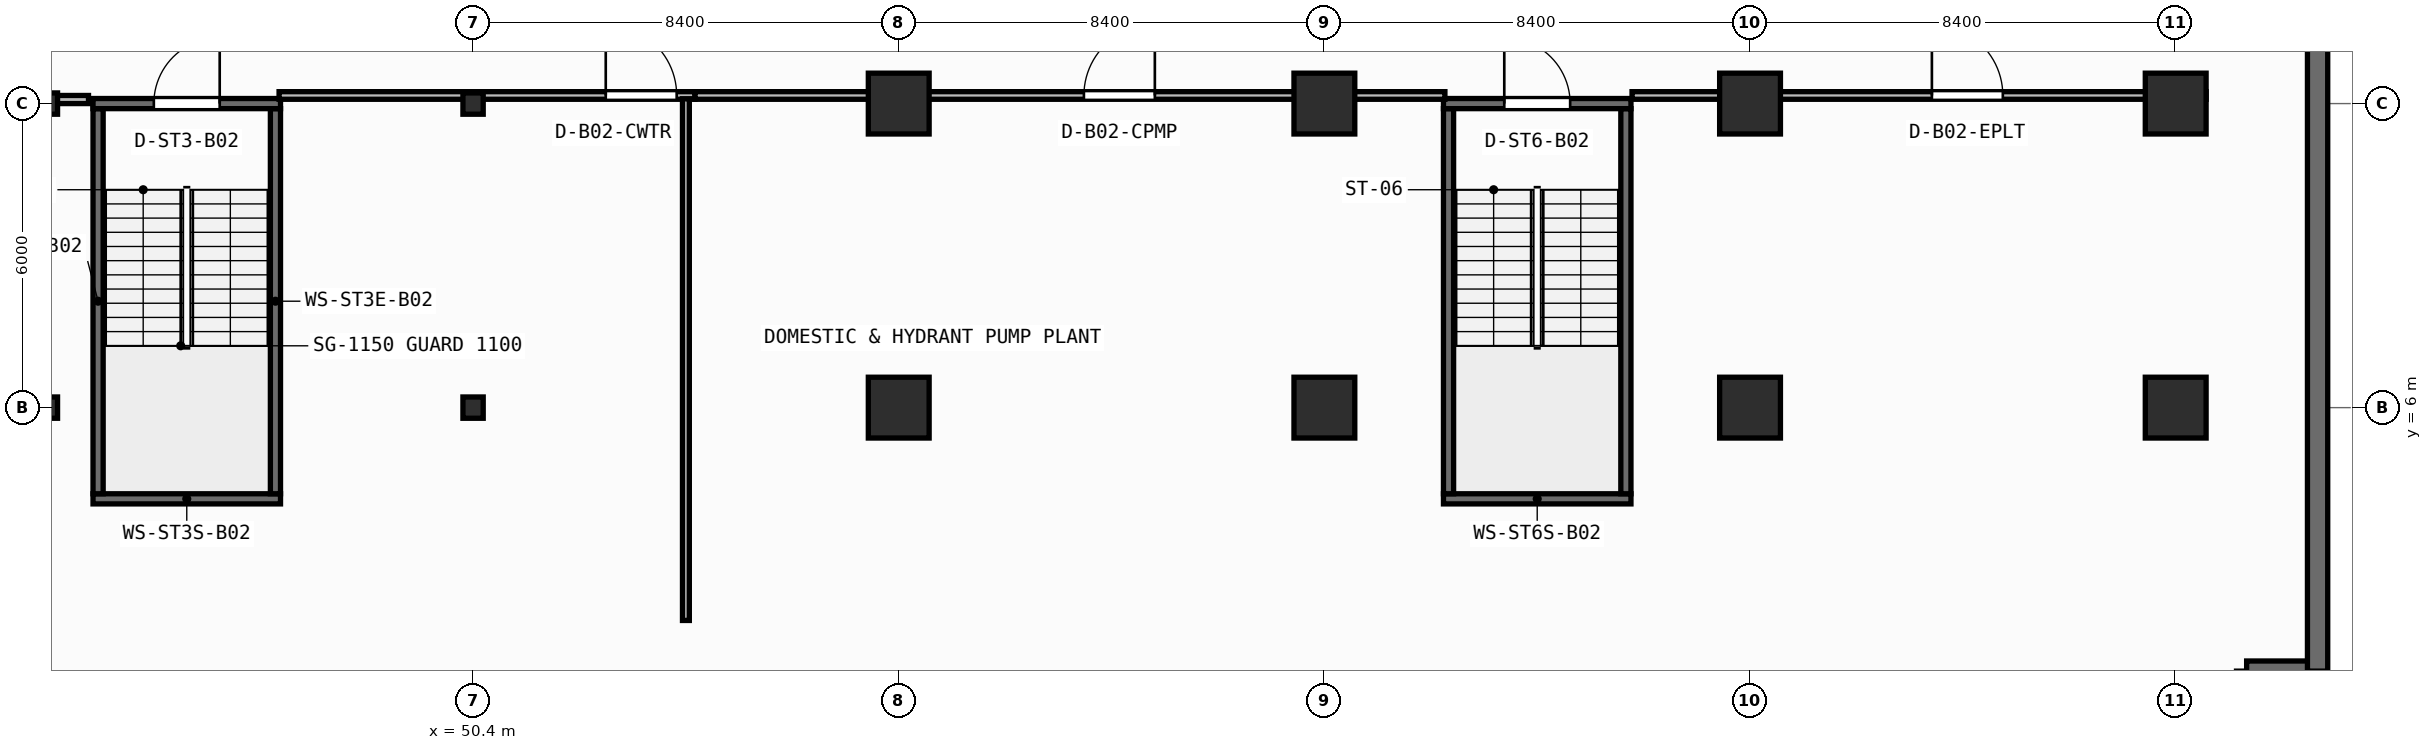
"""IFC4 building model, lengths in metres.
Left out: names, types, materials, properties, quantities, classifications, styles, units other than length and angle.
Written with IfcOpenShell. Run it as: python <this file> out.ifc"""

import sys

from ifc_helpers import new_model, si_unit, direction, frame, frame_2d, origin, origin_2d, place, context, subcontext, project, spatial, rectangle, i_section, extrude, element, fill, save


model = new_model("IFC4")
c1 = context("Model", 3, precision=1e-05, world=origin(), true_north=direction((0.0, 1.0)))
c2 = subcontext(c1, "Body", "Model", "MODEL_VIEW")
j1 = project(units=[si_unit("LENGTHUNIT", "METRE"), si_unit("PLANEANGLEUNIT", "RADIAN")], contexts=[c1])
p1 = place(None, origin())
s1 = spatial("IfcSite", under=j1, at=p1, CompositionType="ELEMENT")
p2 = place(p1, origin())
s2 = spatial("IfcBuilding", under=s1, at=p2, CompositionType="ELEMENT")
p3 = place(p2, frame((0.0, 0.0, -9.0)))
s3 = spatial("IfcBuildingStorey", under=s2, at=p3, CompositionType="ELEMENT", Elevation=-9.0)
for number, where, z_axis, x_axis in (
    (1, (42.0, 6.0, 0.0), (0.0, 0.0, 1.0), (1.0, 0.0, 0.0)),
    (2, (50.4, 6.0, 0.0), (0.0, 0.0, 1.0), (1.0, 0.0, 0.0)),
):
    element("IfcColumn", number, at=place(p3, frame(where, z_axis=z_axis, x_axis=x_axis)), inside=s3, PredefinedType="COLUMN", context=c2, shape_type="SweptSolid", body=[
        extrude(i_section(OverallWidth=0.4, OverallDepth=0.42, WebThickness=0.025, FlangeThickness=0.04, at=origin_2d()), origin(), (0.0, 0.0, 1.0), 4.5),
    ])
for number, where, z_axis, x_axis in (
    (3, (58.8, 6.0, 0.0), (0.0, 0.0, 1.0), (1.0, 0.0, 0.0)),
    (4, (67.2, 6.0, 0.0), (0.0, 0.0, 1.0), (1.0, 0.0, 0.0)),
    (5, (75.6, 6.0, 0.0), (0.0, 0.0, 1.0), (1.0, 0.0, 0.0)),
    (6, (84.0, 6.0, 0.0), (0.0, 0.0, 1.0), (1.0, 0.0, 0.0)),
):
    element("IfcColumn", number, at=place(p3, frame(where, z_axis=z_axis, x_axis=x_axis)), inside=s3, PredefinedType="COLUMN", context=c2, shape_type="SweptSolid", body=[
        extrude(rectangle(XDim=1.2, YDim=1.2, at=origin_2d()), origin(), (0.0, 0.0, 1.0), 4.5),
    ])
for number, where, z_axis, x_axis in (
    (7, (42.0, 12.0, 0.0), (0.0, 0.0, 1.0), (1.0, 0.0, 0.0)),
    (8, (50.4, 12.0, 0.0), (0.0, 0.0, 1.0), (1.0, 0.0, 0.0)),
):
    element("IfcColumn", number, at=place(p3, frame(where, z_axis=z_axis, x_axis=x_axis)), inside=s3, PredefinedType="COLUMN", context=c2, shape_type="SweptSolid", body=[
        extrude(i_section(OverallWidth=0.4, OverallDepth=0.42, WebThickness=0.025, FlangeThickness=0.04, at=origin_2d()), origin(), (0.0, 0.0, 1.0), 4.5),
    ])
for number, where, z_axis, x_axis in (
    (9, (58.8, 12.0, 0.0), (0.0, 0.0, 1.0), (1.0, 0.0, 0.0)),
    (10, (67.2, 12.0, 0.0), (0.0, 0.0, 1.0), (1.0, 0.0, 0.0)),
    (11, (75.6, 12.0, 0.0), (0.0, 0.0, 1.0), (1.0, 0.0, 0.0)),
    (12, (84.0, 12.0, 0.0), (0.0, 0.0, 1.0), (1.0, 0.0, 0.0)),
):
    element("IfcColumn", number, at=place(p3, frame(where, z_axis=z_axis, x_axis=x_axis)), inside=s3, PredefinedType="COLUMN", context=c2, shape_type="SweptSolid", body=[
        extrude(rectangle(XDim=1.2, YDim=1.2, at=origin_2d()), origin(), (0.0, 0.0, 1.0), 4.5),
    ])
for number, where, z_axis, x_axis in (
    (13, (85.4, -0.6, 0.0), (0.0, 0.0, 1.0), (0.0, 1.0, 0.0)),
    (14, (85.4, 0.8, 0.0), (0.0, 0.0, 1.0), (1.0, 0.0, 0.0)),
):
    element("IfcWall", number, at=place(p3, frame(where, z_axis=z_axis, x_axis=x_axis)), inside=s3, PredefinedType="STANDARD", context=c2, shape_type="SweptSolid", body=[
        extrude(rectangle(XDim=1.4, YDim=0.4, at=frame_2d((0.7, 0.0))), origin(), (0.0, 0.0, 1.0), 4.24),
    ])
p4 = place(p3, frame((86.8, 0.8, 0.0), z_axis=(0.0, 0.0, 1.0), x_axis=(0.0, 1.0, 0.0)))
e15 = element("IfcWall", 15, at=p4, inside=s3, PredefinedType="STANDARD", context=c2, shape_type="SweptSolid", body=[
    extrude(rectangle(XDim=44.4, YDim=0.4, at=frame_2d((22.2, 0.0))), origin(), (0.0, 0.0, 1.0), 4.24),
])
p5 = place(p3, frame((42.9, 4.2, 0.0), z_axis=(0.0, 0.0, 1.0), x_axis=(1.0, 0.0, 0.0)))
e16 = element("IfcWall", 16, at=p5, inside=s3, PredefinedType="SHEAR", context=c2, shape_type="SweptSolid", body=[
    extrude(rectangle(XDim=3.7, YDim=0.2, at=frame_2d((1.85, 0.0))), origin(), (0.0, 0.0, 1.0), 4.24),
])
for number, where, z_axis, x_axis in (
    (17, (43.0, 4.3, 0.0), (0.0, 0.0, 1.0), (0.0, 1.0, 0.0)),
    (18, (46.5, 4.3, 0.0), (0.0, 0.0, 1.0), (0.0, 1.0, 0.0)),
):
    element("IfcWall", number, at=place(p3, frame(where, z_axis=z_axis, x_axis=x_axis)), inside=s3, PredefinedType="SHEAR", context=c2, shape_type="SweptSolid", body=[
        extrude(rectangle(XDim=7.6, YDim=0.2, at=frame_2d((3.8, 0.0))), origin(), (0.0, 0.0, 1.0), 4.24),
    ])
p6 = place(p3, frame((42.9, 12.0, 0.0), z_axis=(0.0, 0.0, 1.0), x_axis=(1.0, 0.0, 0.0)))
e19 = element("IfcWall", 19, at=p6, inside=s3, PredefinedType="SHEAR", context=c2, shape_type="SweptSolid", body=[
    extrude(rectangle(XDim=3.7, YDim=0.2, at=frame_2d((1.85, 0.0))), origin(), (0.0, 0.0, 1.0), 4.24),
])
p7 = place(p6, frame((1.2, 0.0, 0.0)))
e20 = element("IfcOpeningElement", 20, at=p7, cuts=e19, PredefinedType="OPENING", context=c2, shape_type="SweptSolid", body=[
    extrude(rectangle(XDim=1.3, YDim=2.15, at=frame_2d((0.65, 1.075))), frame((0.0, 0.11, 0.0), z_axis=(0.0, -1.0, 0.0), x_axis=(1.0, 0.0, 0.0)), (0.0, 0.0, 1.0), 0.22),
])
p8 = place(p3, frame((69.55, 4.2, 0.0), z_axis=(0.0, 0.0, 1.0), x_axis=(1.0, 0.0, 0.0)))
e21 = element("IfcWall", 21, at=p8, inside=s3, PredefinedType="SHEAR", context=c2, shape_type="SweptSolid", body=[
    extrude(rectangle(XDim=3.7, YDim=0.2, at=frame_2d((1.85, 0.0))), origin(), (0.0, 0.0, 1.0), 4.24),
])
for number, where, z_axis, x_axis in (
    (22, (69.65, 4.3, 0.0), (0.0, 0.0, 1.0), (0.0, 1.0, 0.0)),
    (23, (73.15, 4.3, 0.0), (0.0, 0.0, 1.0), (0.0, 1.0, 0.0)),
):
    element("IfcWall", number, at=place(p3, frame(where, z_axis=z_axis, x_axis=x_axis)), inside=s3, PredefinedType="SHEAR", context=c2, shape_type="SweptSolid", body=[
        extrude(rectangle(XDim=7.6, YDim=0.2, at=frame_2d((3.8, 0.0))), origin(), (0.0, 0.0, 1.0), 4.24),
    ])
p9 = place(p3, frame((69.55, 12.0, 0.0), z_axis=(0.0, 0.0, 1.0), x_axis=(1.0, 0.0, 0.0)))
e24 = element("IfcWall", 24, at=p9, inside=s3, PredefinedType="SHEAR", context=c2, shape_type="SweptSolid", body=[
    extrude(rectangle(XDim=3.7, YDim=0.2, at=frame_2d((1.85, 0.0))), origin(), (0.0, 0.0, 1.0), 4.24),
])
p10 = place(p9, frame((1.2, 0.0, 0.0)))
e25 = element("IfcOpeningElement", 25, at=p10, cuts=e24, PredefinedType="OPENING", context=c2, shape_type="SweptSolid", body=[
    extrude(rectangle(XDim=1.3, YDim=2.15, at=frame_2d((0.65, 1.075))), frame((0.0, 0.11, 0.0), z_axis=(0.0, -1.0, 0.0), x_axis=(1.0, 0.0, 0.0)), (0.0, 0.0, 1.0), 0.22),
])
p11 = place(p3, frame((46.572, 12.16, 0.0), z_axis=(0.0, 0.0, 1.0), x_axis=(1.0, 0.0, 0.0)))
e26 = element("IfcWall", 26, at=p11, inside=s3, PredefinedType="PARTITIONING", context=c2, shape_type="SweptSolid", body=[
    extrude(rectangle(XDim=8.207, YDim=0.15, at=frame_2d((4.104, 0.0))), origin(), (0.0, 0.0, 1.0), 3.305),
])
p12 = place(p11, frame((6.447, 0.0, 0.0)))
e27 = element("IfcOpeningElement", 27, at=p12, cuts=e26, PredefinedType="OPENING", context=c2, shape_type="SweptSolid", body=[
    extrude(rectangle(XDim=1.4, YDim=2.15, at=frame_2d((0.7, 1.075))), frame((0.0, 0.085, 0.0), z_axis=(0.0, -1.0, 0.0), x_axis=(1.0, 0.0, 0.0)), (0.0, 0.0, 1.0), 0.17),
])
p13 = place(p3, frame((54.781, 12.16, 0.0), z_axis=(0.0, 0.0, 1.0), x_axis=(1.0, 0.0, 0.0)))
e28 = element("IfcWall", 28, at=p13, inside=s3, PredefinedType="PARTITIONING", context=c2, shape_type="SweptSolid", body=[
    extrude(rectangle(XDim=14.798, YDim=0.15, at=frame_2d((7.399, 0.0))), origin(), (0.0, 0.0, 1.0), 3.305),
])
p14 = place(p13, frame((7.674, 0.0, 0.0)))
e29 = element("IfcOpeningElement", 29, at=p14, cuts=e28, PredefinedType="OPENING", context=c2, shape_type="SweptSolid", body=[
    extrude(rectangle(XDim=1.4, YDim=2.15, at=frame_2d((0.7, 1.075))), frame((0.0, 0.085, 0.0), z_axis=(0.0, -1.0, 0.0), x_axis=(1.0, 0.0, 0.0)), (0.0, 0.0, 1.0), 0.17),
])
p15 = place(p3, frame((73.271, 12.16, 0.0), z_axis=(0.0, 0.0, 1.0), x_axis=(1.0, 0.0, 0.0)))
e30 = element("IfcWall", 30, at=p15, inside=s3, PredefinedType="PARTITIONING", context=c2, shape_type="SweptSolid", body=[
    extrude(rectangle(XDim=11.329, YDim=0.15, at=frame_2d((5.664, 0.0))), origin(), (0.0, 0.0, 1.0), 3.305),
])
p16 = place(p15, frame((5.917, 0.0, 0.0)))
e31 = element("IfcOpeningElement", 31, at=p16, cuts=e30, PredefinedType="OPENING", context=c2, shape_type="SweptSolid", body=[
    extrude(rectangle(XDim=1.4, YDim=2.15, at=frame_2d((0.7, 1.075))), frame((0.0, 0.085, 0.0), z_axis=(0.0, -1.0, 0.0), x_axis=(1.0, 0.0, 0.0)), (0.0, 0.0, 1.0), 0.17),
])
p17 = place(p3, frame((54.6, 1.8, 0.0), z_axis=(0.0, 0.0, 1.0), x_axis=(0.0, 1.0, 0.0)))
e32 = element("IfcWall", 32, at=p17, inside=s3, PredefinedType="PARTITIONING", context=c2, shape_type="SweptSolid", body=[
    extrude(rectangle(XDim=10.295, YDim=0.135, at=frame_2d((5.147, 0.0))), origin(), (0.0, 0.0, 1.0), 4.24),
])
p18 = place(p3, frame((38.659, 12.08, 0.0), z_axis=(0.0, 0.0, 1.0), x_axis=(1.0, 0.0, 0.0)))
e33 = element("IfcWall", 33, at=p18, inside=s3, PredefinedType="PARTITIONING", context=c2, shape_type="SweptSolid", body=[
    extrude(rectangle(XDim=4.151, YDim=0.16, at=frame_2d((2.076, 0.0))), origin(), (0.0, 0.0, 1.0), 3.305),
])
p19 = place(p7, origin())
e34 = element("IfcDoor", 34, at=p19, inside=s3, OperationType="SINGLE_SWING_RIGHT", PredefinedType="DOOR", context=c2, shape_type="SweptSolid", body=[
    extrude(rectangle(XDim=1.3, YDim=2.15, at=frame_2d((0.65, 1.075))), frame((0.0, 0.025, 0.0), z_axis=(0.0, -1.0, 0.0), x_axis=(1.0, 0.0, 0.0)), (0.0, 0.0, 1.0), 0.05),
])
fill(e20, e34)
p20 = place(p10, origin())
e35 = element("IfcDoor", 35, at=p20, inside=s3, OperationType="SINGLE_SWING_LEFT", PredefinedType="DOOR", context=c2, shape_type="SweptSolid", body=[
    extrude(rectangle(XDim=1.3, YDim=2.15, at=frame_2d((0.65, 1.075))), frame((0.0, 0.025, 0.0), z_axis=(0.0, -1.0, 0.0), x_axis=(1.0, 0.0, 0.0)), (0.0, 0.0, 1.0), 0.05),
])
fill(e25, e35)
p21 = place(p12, origin())
e36 = element("IfcDoor", 36, at=p21, inside=s3, OperationType="SINGLE_SWING_LEFT", PredefinedType="DOOR", context=c2, shape_type="SweptSolid", body=[
    extrude(rectangle(XDim=1.4, YDim=2.15, at=frame_2d((0.7, 1.075))), frame((0.0, 0.025, 0.0), z_axis=(0.0, -1.0, 0.0), x_axis=(1.0, 0.0, 0.0)), (0.0, 0.0, 1.0), 0.05),
])
fill(e27, e36)
p22 = place(p14, origin())
e37 = element("IfcDoor", 37, at=p22, inside=s3, OperationType="SINGLE_SWING_RIGHT", PredefinedType="DOOR", context=c2, shape_type="SweptSolid", body=[
    extrude(rectangle(XDim=1.4, YDim=2.15, at=frame_2d((0.7, 1.075))), frame((0.0, 0.025, 0.0), z_axis=(0.0, -1.0, 0.0), x_axis=(1.0, 0.0, 0.0)), (0.0, 0.0, 1.0), 0.05),
])
fill(e29, e37)
p23 = place(p16, origin())
e38 = element("IfcDoor", 38, at=p23, inside=s3, OperationType="SINGLE_SWING_LEFT", PredefinedType="DOOR", context=c2, shape_type="SweptSolid", body=[
    extrude(rectangle(XDim=1.4, YDim=2.15, at=frame_2d((0.7, 1.075))), frame((0.0, 0.025, 0.0), z_axis=(0.0, -1.0, 0.0), x_axis=(1.0, 0.0, 0.0)), (0.0, 0.0, 1.0), 0.05),
])
fill(e31, e38)
save(model, sys.argv[1])
